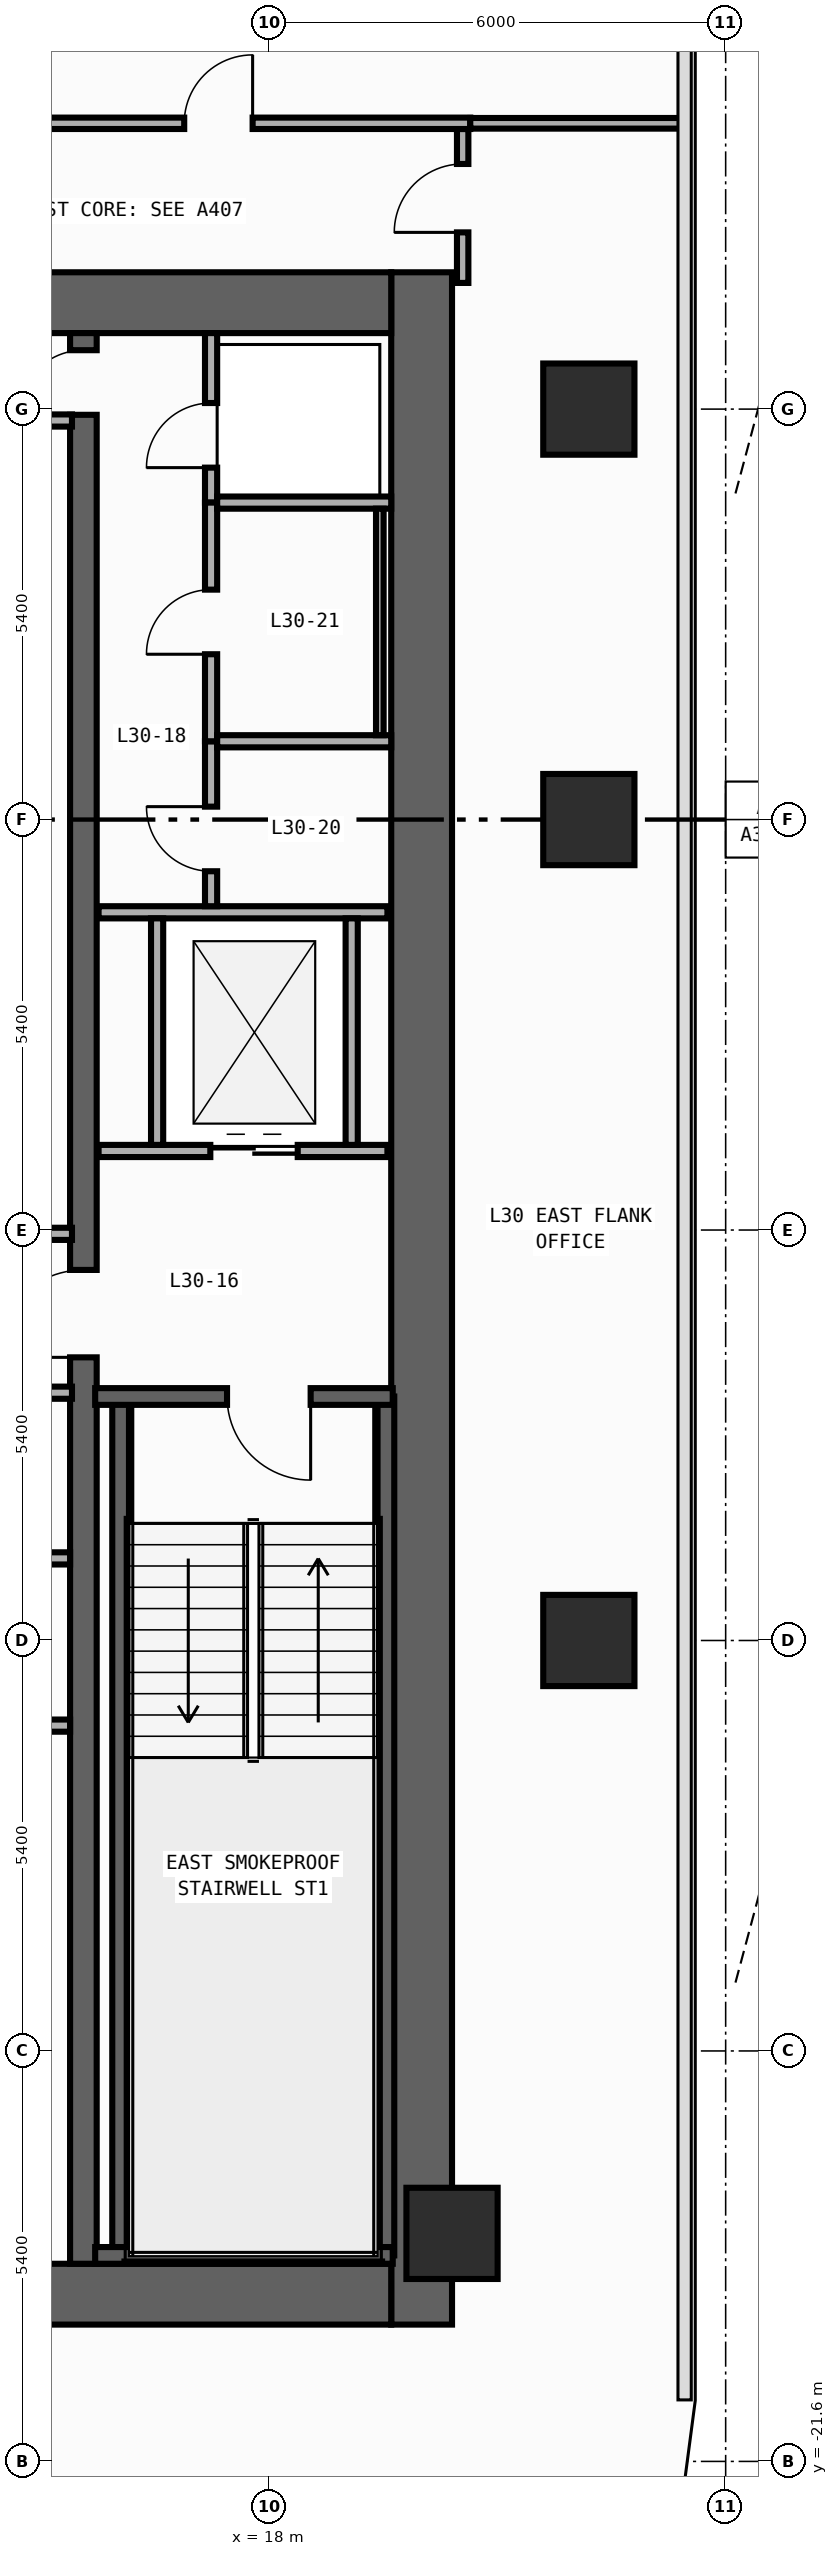
"""IFC4 building model, lengths in metres.
Left out: names, types, materials, properties, quantities, classifications, styles, units other than length and angle.
Written with IfcOpenShell. Run it as: python <this file> out.ifc"""

import sys

from ifc_helpers import new_model, si_unit, direction, frame, frame_2d, origin, origin_2d, place, context, subcontext, project, spatial, rectangle, extrude, element, fill, save


model = new_model("IFC4")
c1 = context("Model", 3, precision=1e-05, world=origin(), true_north=direction((0.0, 1.0)))
c2 = subcontext(c1, "Body", "Model", "MODEL_VIEW")
j1 = project(units=[si_unit("LENGTHUNIT", "METRE"), si_unit("PLANEANGLEUNIT", "RADIAN")], contexts=[c1])
p1 = place(None, origin())
s1 = spatial("IfcSite", under=j1, at=p1, CompositionType="ELEMENT")
p2 = place(p1, origin())
s2 = spatial("IfcBuilding", under=s1, at=p2, CompositionType="ELEMENT")
p3 = place(p2, frame((0.0, 0.0, 131.0)))
s3 = spatial("IfcBuildingStorey", under=s2, at=p3, CompositionType="ELEMENT", Elevation=131.0)
p4 = place(p3, frame((20.0, -19.8, 0.0), z_axis=(0.0, 0.0, 1.0), x_axis=(0.0, 1.0, 0.0)))
e1 = element("IfcWall", 1, at=p4, inside=s3, PredefinedType="SHEAR", context=c2, shape_type="SweptSolid", body=[
    extrude(rectangle(XDim=27.0, YDim=0.8, at=frame_2d((13.5, 0.0))), origin(), (0.0, 0.0, 1.0), 3.94),
])
for number, where, z_axis, x_axis in (
    (2, (12.8, -19.4, 0.0), (0.0, 0.0, 1.0), (1.0, 0.0, 0.0)),
    (3, (12.8, 6.8, 0.0), (0.0, 0.0, 1.0), (1.0, 0.0, 0.0)),
):
    element("IfcWall", number, at=place(p3, frame(where, z_axis=z_axis, x_axis=x_axis)), inside=s3, PredefinedType="SHEAR", context=c2, shape_type="SweptSolid", body=[
        extrude(rectangle(XDim=6.8, YDim=0.8, at=frame_2d((3.4, 0.0))), origin(), (0.0, 0.0, 1.0), 3.94),
    ])
p5 = place(p3, frame((15.55, -19.0, 0.0), z_axis=(0.0, 0.0, 1.0), x_axis=(0.0, 1.0, 0.0)))
e4 = element("IfcWall", 4, at=p5, inside=s3, PredefinedType="SHEAR", context=c2, shape_type="SweptSolid", body=[
    extrude(rectangle(XDim=25.4, YDim=0.35, at=frame_2d((12.7, 0.0))), origin(), (0.0, 0.0, 1.0), 3.94),
])
p6 = place(p5, frame((11.925, 0.0, 0.0)))
e5 = element("IfcOpeningElement", 5, at=p6, cuts=e4, PredefinedType="OPENING", context=c2, shape_type="SweptSolid", body=[
    extrude(rectangle(XDim=1.15, YDim=2.2, at=frame_2d((0.575, 1.1))), frame((0.0, 0.185, 0.0), z_axis=(0.0, -1.0, 0.0), x_axis=(1.0, 0.0, 0.0)), (0.0, 0.0, 1.0), 0.37),
])
p7 = place(p5, frame((24.325, 0.0, 0.0)))
e6 = element("IfcOpeningElement", 6, at=p7, cuts=e4, PredefinedType="OPENING", context=c2, shape_type="SweptSolid", body=[
    extrude(rectangle(XDim=0.85, YDim=2.1, at=frame_2d((0.425, 1.05))), frame((0.0, 0.185, 0.0), z_axis=(0.0, -1.0, 0.0), x_axis=(1.0, 0.0, 0.0)), (0.0, 0.0, 1.0), 0.37),
])
for number, where, z_axis, x_axis in (
    (7, (16.04, -18.89, 0.0), (0.0, 0.0, 1.0), (0.0, 1.0, 0.0)),
    (8, (19.53, -18.89, 0.0), (0.0, 0.0, 1.0), (0.0, 1.0, 0.0)),
):
    element("IfcWall", number, at=place(p3, frame(where, z_axis=z_axis, x_axis=x_axis)), inside=s3, PredefinedType="SHEAR", context=c2, shape_type="SweptSolid", body=[
        extrude(rectangle(XDim=11.3, YDim=0.22, at=frame_2d((5.65, 0.0))), origin(), (0.0, 0.0, 1.0), 3.94),
    ])
p8 = place(p3, frame((15.705, -18.89, 0.0), z_axis=(0.0, 0.0, 1.0), x_axis=(1.0, 0.0, 0.0)))
e9 = element("IfcWall", 9, at=p8, inside=s3, PredefinedType="SHEAR", context=c2, shape_type="SweptSolid", body=[
    extrude(rectangle(XDim=3.915, YDim=0.22, at=frame_2d((1.958, 0.0))), origin(), (0.0, 0.0, 1.0), 3.94),
])
p9 = place(p3, frame((19.62, -7.59, 0.0), z_axis=(0.0, 0.0, 1.0), x_axis=(-1.0, 0.0, 0.0)))
e10 = element("IfcWall", 10, at=p9, inside=s3, PredefinedType="SHEAR", context=c2, shape_type="SweptSolid", body=[
    extrude(rectangle(XDim=3.915, YDim=0.22, at=frame_2d((1.958, 0.0))), origin(), (0.0, 0.0, 1.0), 3.94),
])
p10 = place(p9, frame((1.08, 0.0, 0.0)))
e11 = element("IfcOpeningElement", 11, at=p10, cuts=e10, PredefinedType="OPENING", context=c2, shape_type="SweptSolid", body=[
    extrude(rectangle(XDim=1.1, YDim=2.2, at=frame_2d((0.55, 1.1))), frame((0.0, 0.12, 0.0), z_axis=(0.0, -1.0, 0.0), x_axis=(1.0, 0.0, 0.0)), (0.0, 0.0, 1.0), 0.24),
])
for number, where, z_axis, x_axis in (
    (12, (20.4, -18.6, 0.0), (0.0, 0.0, 1.0), (1.0, 0.0, 0.0)),
    (13, (22.2, -10.8, 0.0), (0.0, 0.0, 1.0), (1.0, 0.0, 0.0)),
    (14, (22.2, 0.0, 0.0), (0.0, 0.0, 1.0), (1.0, 0.0, 0.0)),
    (15, (22.2, 5.4, 0.0), (0.0, 0.0, 1.0), (1.0, 0.0, 0.0)),
):
    element("IfcColumn", number, at=place(p3, frame(where, z_axis=z_axis, x_axis=x_axis)), inside=s3, PredefinedType="COLUMN", context=c2, shape_type="SweptSolid", body=[
        extrude(rectangle(XDim=1.2, YDim=1.2, at=origin_2d()), origin(), (0.0, 0.0, 1.0), 4.2),
    ])
p11 = place(p3, frame((15.75, -4.36, 0.0), z_axis=(0.0, 0.0, 1.0), x_axis=(1.0, 0.0, 0.0)))
e16 = element("IfcWall", 16, at=p11, inside=s3, PredefinedType="STANDARD", context=c2, shape_type="SweptSolid", body=[
    extrude(rectangle(XDim=3.8, YDim=0.16, at=frame_2d((1.9, 0.0))), origin(), (0.0, 0.0, 1.0), 3.94),
])
p12 = place(p11, frame((1.47, 0.0, 0.0)))
e17 = element("IfcOpeningElement", 17, at=p12, cuts=e16, PredefinedType="OPENING", context=c2, shape_type="SweptSolid", body=[
    extrude(rectangle(XDim=1.15, YDim=2.2, at=frame_2d((0.575, 1.1))), frame((0.0, 0.09, 0.0), z_axis=(0.0, -1.0, 0.0), x_axis=(1.0, 0.0, 0.0)), (0.0, 0.0, 1.0), 0.18),
])
p13 = place(p3, frame((15.75, -1.22, 0.0), z_axis=(0.0, 0.0, 1.0), x_axis=(1.0, 0.0, 0.0)))
e18 = element("IfcWall", 18, at=p13, inside=s3, PredefinedType="STANDARD", context=c2, shape_type="SweptSolid", body=[
    extrude(rectangle(XDim=3.8, YDim=0.16, at=frame_2d((1.9, 0.0))), origin(), (0.0, 0.0, 1.0), 3.94),
])
for number, where, z_axis, x_axis in (
    (19, (16.52, -4.28, 0.0), (0.0, 0.0, 1.0), (0.0, 1.0, 0.0)),
    (20, (19.08, -4.28, 0.0), (0.0, 0.0, 1.0), (0.0, 1.0, 0.0)),
):
    element("IfcWall", number, at=place(p3, frame(where, z_axis=z_axis, x_axis=x_axis)), inside=s3, PredefinedType="STANDARD", context=c2, shape_type="SweptSolid", body=[
        extrude(rectangle(XDim=2.98, YDim=0.16, at=frame_2d((1.49, 0.0))), origin(), (0.0, 0.0, 1.0), 3.94),
    ])
for number, where, z_axis, x_axis in (
    (21, (12.8, -5.45, 0.0), (0.0, 0.0, 1.0), (1.0, 0.0, 0.0)),
    (22, (12.8, -7.54, 0.0), (0.0, 0.0, 1.0), (1.0, 0.0, 0.0)),
    (23, (12.8, 5.25, 0.0), (0.0, 0.0, 1.0), (1.0, 0.0, 0.0)),
):
    element("IfcWall", number, at=place(p3, frame(where, z_axis=z_axis, x_axis=x_axis)), inside=s3, PredefinedType="STANDARD", context=c2, shape_type="SweptSolid", body=[
        extrude(rectangle(XDim=2.6, YDim=0.16, at=frame_2d((1.3, 0.0))), origin(), (0.0, 0.0, 1.0), 3.94),
    ])
p14 = place(p3, frame((17.23, 4.17, 0.0), z_axis=(0.0, 0.0, 1.0), x_axis=(0.0, 1.0, 0.0)))
e24 = element("IfcWall", 24, at=p14, inside=s3, PredefinedType="PARTITIONING", context=c2, shape_type="SweptSolid", body=[
    extrude(rectangle(XDim=2.23, YDim=0.16, at=frame_2d((1.115, 0.0))), origin(), (0.0, 0.0, 1.0), 3.94),
])
p15 = place(p14, frame((0.46, 0.0, 0.0)))
e25 = element("IfcOpeningElement", 25, at=p15, cuts=e24, PredefinedType="OPENING", context=c2, shape_type="SweptSolid", body=[
    extrude(rectangle(XDim=0.85, YDim=2.1, at=frame_2d((0.425, 1.05))), frame((0.0, 0.09, 0.0), z_axis=(0.0, -1.0, 0.0), x_axis=(1.0, 0.0, 0.0)), (0.0, 0.0, 1.0), 0.18),
])
p16 = place(p3, frame((17.23, -1.14, 0.0), z_axis=(0.0, 0.0, 1.0), x_axis=(0.0, 1.0, 0.0)))
e26 = element("IfcWall", 26, at=p16, inside=s3, PredefinedType="PARTITIONING", context=c2, shape_type="SweptSolid", body=[
    extrude(rectangle(XDim=2.17, YDim=0.16, at=frame_2d((1.085, 0.0))), origin(), (0.0, 0.0, 1.0), 3.94),
])
p17 = place(p16, frame((0.46, 0.0, 0.0)))
e27 = element("IfcOpeningElement", 27, at=p17, cuts=e26, PredefinedType="OPENING", context=c2, shape_type="SweptSolid", body=[
    extrude(rectangle(XDim=0.85, YDim=2.1, at=frame_2d((0.425, 1.05))), frame((0.0, 0.09, 0.0), z_axis=(0.0, -1.0, 0.0), x_axis=(1.0, 0.0, 0.0)), (0.0, 0.0, 1.0), 0.18),
])
p18 = place(p3, frame((17.23, 1.03, 0.0), z_axis=(0.0, 0.0, 1.0), x_axis=(0.0, 1.0, 0.0)))
e28 = element("IfcWall", 28, at=p18, inside=s3, PredefinedType="PARTITIONING", context=c2, shape_type="SweptSolid", body=[
    extrude(rectangle(XDim=3.14, YDim=0.16, at=frame_2d((1.57, 0.0))), origin(), (0.0, 0.0, 1.0), 3.94),
])
p19 = place(p18, frame((1.145, 0.0, 0.0)))
e29 = element("IfcOpeningElement", 29, at=p19, cuts=e28, PredefinedType="OPENING", context=c2, shape_type="SweptSolid", body=[
    extrude(rectangle(XDim=0.85, YDim=2.1, at=frame_2d((0.425, 1.05))), frame((0.0, 0.09, 0.0), z_axis=(0.0, -1.0, 0.0), x_axis=(1.0, 0.0, 0.0)), (0.0, 0.0, 1.0), 0.18),
])
for number, where, z_axis, x_axis in (
    (30, (17.31, 4.17, 0.0), (0.0, 0.0, 1.0), (1.0, 0.0, 0.0)),
    (31, (17.31, 1.03, 0.0), (0.0, 0.0, 1.0), (1.0, 0.0, 0.0)),
):
    element("IfcWall", number, at=place(p3, frame(where, z_axis=z_axis, x_axis=x_axis)), inside=s3, PredefinedType="PARTITIONING", context=c2, shape_type="SweptSolid", body=[
        extrude(rectangle(XDim=2.29, YDim=0.16, at=frame_2d((1.145, 0.0))), origin(), (0.0, 0.0, 1.0), 3.94),
    ])
for number, where, z_axis, x_axis in (
    (32, (12.31, -11.92, 0.0), (0.0, 0.0, 1.0), (1.0, 0.0, 0.0)),
    (33, (12.31, -9.72, 0.0), (0.0, 0.0, 1.0), (1.0, 0.0, 0.0)),
):
    element("IfcWall", number, at=place(p3, frame(where, z_axis=z_axis, x_axis=x_axis)), inside=s3, PredefinedType="PARTITIONING", context=c2, shape_type="SweptSolid", body=[
        extrude(rectangle(XDim=3.065, YDim=0.16, at=frame_2d((1.532, 0.0))), origin(), (0.0, 0.0, 1.0), 3.94),
    ])
p20 = place(p3, frame((20.54, 7.06, 0.0), z_axis=(0.0, 0.0, 1.0), x_axis=(0.0, 1.0, 0.0)))
e34 = element("IfcWall", 34, at=p20, inside=s3, PredefinedType="PARTITIONING", context=c2, shape_type="SweptSolid", body=[
    extrude(rectangle(XDim=2.025, YDim=0.15, at=frame_2d((1.012, 0.0))), origin(), (0.0, 0.0, 1.0), 3.94),
])
p21 = place(p20, frame((0.665, 0.0, 0.0)))
e35 = element("IfcOpeningElement", 35, at=p21, cuts=e34, PredefinedType="OPENING", context=c2, shape_type="SweptSolid", body=[
    extrude(rectangle(XDim=0.9, YDim=2.15, at=frame_2d((0.45, 1.075))), frame((0.0, 0.085, 0.0), z_axis=(0.0, -1.0, 0.0), x_axis=(1.0, 0.0, 0.0)), (0.0, 0.0, 1.0), 0.17),
])
p22 = place(p3, frame((11.81, 9.16, 0.0), z_axis=(0.0, 0.0, 1.0), x_axis=(1.0, 0.0, 0.0)))
e36 = element("IfcWall", 36, at=p22, inside=s3, PredefinedType="PARTITIONING", context=c2, shape_type="SweptSolid", body=[
    extrude(rectangle(XDim=8.83, YDim=0.15, at=frame_2d((4.415, 0.0))), origin(), (0.0, 0.0, 1.0), 3.94),
])
p23 = place(p22, frame((5.067, 0.0, 0.0)))
e37 = element("IfcOpeningElement", 37, at=p23, cuts=e36, PredefinedType="OPENING", context=c2, shape_type="SweptSolid", body=[
    extrude(rectangle(XDim=0.9, YDim=2.15, at=frame_2d((0.45, 1.075))), frame((0.0, 0.085, 0.0), z_axis=(0.0, -1.0, 0.0), x_axis=(1.0, 0.0, 0.0)), (0.0, 0.0, 1.0), 0.17),
])
p24 = place(p3, frame((20.64, 9.16, 0.0), z_axis=(0.0, 0.0, 1.0), x_axis=(1.0, 0.0, 0.0)))
e38 = element("IfcWall", 38, at=p24, inside=s3, PredefinedType="PARTITIONING", context=c2, shape_type="SweptSolid", body=[
    extrude(rectangle(XDim=2.815, YDim=0.14, at=frame_2d((1.408, 0.0))), origin(), (0.0, 0.0, 1.0), 3.94),
])
p25 = place(p3, frame((19.45, 4.09, 0.0), z_axis=(0.0, 0.0, 1.0), x_axis=(0.0, -1.0, 0.0)))
e39 = element("IfcWall", 39, at=p25, inside=s3, PredefinedType="PARTITIONING", context=c2, shape_type="SweptSolid", body=[
    extrude(rectangle(XDim=2.98, YDim=0.1, at=frame_2d((1.49, 0.0))), origin(), (0.0, 0.0, 1.0), 3.94),
])
p26 = place(p10, origin())
e40 = element("IfcDoor", 40, at=p26, inside=s3, OperationType="SINGLE_SWING_LEFT", PredefinedType="DOOR", context=c2, shape_type="SweptSolid", body=[
    extrude(rectangle(XDim=1.1, YDim=2.2, at=frame_2d((0.55, 1.1))), frame((0.0, 0.025, 0.0), z_axis=(0.0, -1.0, 0.0), x_axis=(1.0, 0.0, 0.0)), (0.0, 0.0, 1.0), 0.05),
])
fill(e11, e40)
p27 = place(p6, origin())
e41 = element("IfcDoor", 41, at=p27, inside=s3, OperationType="SINGLE_SWING_LEFT", PredefinedType="DOOR", context=c2, shape_type="SweptSolid", body=[
    extrude(rectangle(XDim=1.15, YDim=2.2, at=frame_2d((0.575, 1.1))), frame((0.0, 0.025, 0.0), z_axis=(0.0, -1.0, 0.0), x_axis=(1.0, 0.0, 0.0)), (0.0, 0.0, 1.0), 0.05),
])
fill(e5, e41)
p28 = place(p7, origin())
e42 = element("IfcDoor", 42, at=p28, inside=s3, OperationType="SINGLE_SWING_LEFT", PredefinedType="DOOR", context=c2, shape_type="SweptSolid", body=[
    extrude(rectangle(XDim=0.85, YDim=2.1, at=frame_2d((0.425, 1.05))), frame((0.0, 0.025, 0.0), z_axis=(0.0, -1.0, 0.0), x_axis=(1.0, 0.0, 0.0)), (0.0, 0.0, 1.0), 0.05),
])
fill(e6, e42)
p29 = place(p12, origin())
e43 = element("IfcDoor", 43, at=p29, inside=s3, OperationType="DOUBLE_DOOR_SLIDING", PredefinedType="DOOR", context=c2, shape_type="SweptSolid", body=[
    extrude(rectangle(XDim=1.15, YDim=2.2, at=frame_2d((0.575, 1.1))), frame((0.0, 0.025, 0.0), z_axis=(0.0, -1.0, 0.0), x_axis=(1.0, 0.0, 0.0)), (0.0, 0.0, 1.0), 0.05),
])
fill(e17, e43)
p30 = place(p15, origin())
e44 = element("IfcDoor", 44, at=p30, inside=s3, OperationType="SINGLE_SWING_LEFT", PredefinedType="DOOR", context=c2, shape_type="SweptSolid", body=[
    extrude(rectangle(XDim=0.85, YDim=2.1, at=frame_2d((0.425, 1.05))), frame((0.0, 0.025, 0.0), z_axis=(0.0, -1.0, 0.0), x_axis=(1.0, 0.0, 0.0)), (0.0, 0.0, 1.0), 0.05),
])
fill(e25, e44)
p31 = place(p17, origin())
e45 = element("IfcDoor", 45, at=p31, inside=s3, OperationType="SINGLE_SWING_RIGHT", PredefinedType="DOOR", context=c2, shape_type="SweptSolid", body=[
    extrude(rectangle(XDim=0.85, YDim=2.1, at=frame_2d((0.425, 1.05))), frame((0.0, 0.025, 0.0), z_axis=(0.0, -1.0, 0.0), x_axis=(1.0, 0.0, 0.0)), (0.0, 0.0, 1.0), 0.05),
])
fill(e27, e45)
p32 = place(p19, origin())
e46 = element("IfcDoor", 46, at=p32, inside=s3, OperationType="SINGLE_SWING_LEFT", PredefinedType="DOOR", context=c2, shape_type="SweptSolid", body=[
    extrude(rectangle(XDim=0.85, YDim=2.1, at=frame_2d((0.425, 1.05))), frame((0.0, 0.025, 0.0), z_axis=(0.0, -1.0, 0.0), x_axis=(1.0, 0.0, 0.0)), (0.0, 0.0, 1.0), 0.05),
])
fill(e29, e46)
p33 = place(p21, origin())
e47 = element("IfcDoor", 47, at=p33, inside=s3, OperationType="SINGLE_SWING_LEFT", PredefinedType="DOOR", context=c2, shape_type="SweptSolid", body=[
    extrude(rectangle(XDim=0.9, YDim=2.15, at=frame_2d((0.45, 1.075))), frame((0.0, 0.025, 0.0), z_axis=(0.0, -1.0, 0.0), x_axis=(1.0, 0.0, 0.0)), (0.0, 0.0, 1.0), 0.05),
])
fill(e35, e47)
p34 = place(p23, origin())
e48 = element("IfcDoor", 48, at=p34, inside=s3, OperationType="SINGLE_SWING_RIGHT", PredefinedType="DOOR", context=c2, shape_type="SweptSolid", body=[
    extrude(rectangle(XDim=0.9, YDim=2.15, at=frame_2d((0.45, 1.075))), frame((0.0, 0.025, 0.0), z_axis=(0.0, -1.0, 0.0), x_axis=(1.0, 0.0, 0.0)), (0.0, 0.0, 1.0), 0.05),
])
fill(e37, e48)
save(model, sys.argv[1])
